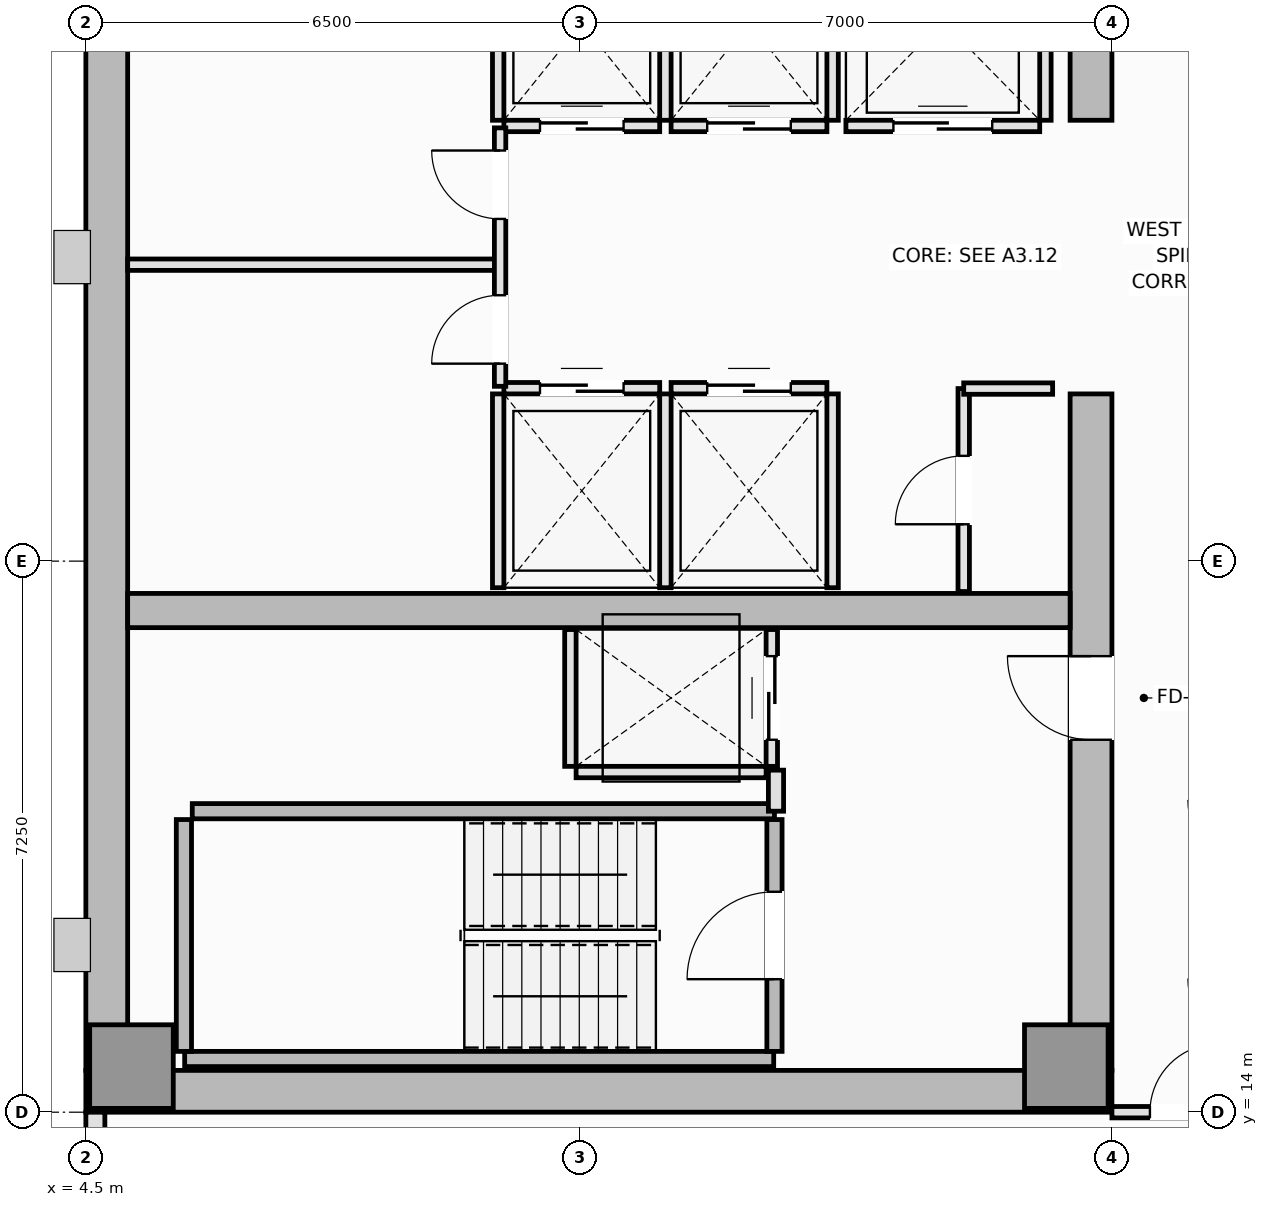
"""IFC4 building model, lengths in metres.
Left out: names, types, materials, properties, quantities, classifications, styles, units other than length and angle.
Written with IfcOpenShell. Run it as: python <this file> out.ifc"""

import sys

from ifc_helpers import new_model, si_unit, direction, frame, frame_2d, origin, origin_2d, place, context, subcontext, project, spatial, rectangle, extrude, element, fill, save


model = new_model("IFC4")
c1 = context("Model", 3, precision=1e-05, world=origin(), true_north=direction((0.0, 1.0)))
c2 = subcontext(c1, "Body", "Model", "MODEL_VIEW")
j1 = project(units=[si_unit("LENGTHUNIT", "METRE"), si_unit("PLANEANGLEUNIT", "RADIAN")], contexts=[c1])
p1 = place(None, origin())
s1 = spatial("IfcSite", under=j1, at=p1, CompositionType="ELEMENT")
p2 = place(p1, origin())
s2 = spatial("IfcBuilding", under=s1, at=p2, CompositionType="ELEMENT")
p3 = place(p2, frame((0.0, 0.0, 209.35)))
s3 = spatial("IfcBuildingStorey", under=s2, at=p3, CompositionType="ELEMENT", Elevation=209.35)
p4 = place(p3, frame((4.5, 14.275, 0.0), z_axis=(0.0, 0.0, 1.0), x_axis=(1.0, 0.0, 0.0)))
e1 = element("IfcWall", 1, at=p4, inside=s3, PredefinedType="SHEAR", context=c2, shape_type="SweptSolid", body=[
    extrude(rectangle(XDim=13.5, YDim=0.55, at=frame_2d((6.75, 0.0))), origin(), (0.0, 0.0, 1.0), 3.55),
])
p5 = place(p3, frame((4.775, 14.55, 0.0), z_axis=(0.0, 0.0, 1.0), x_axis=(0.0, 1.0, 0.0)))
e2 = element("IfcWall", 2, at=p5, inside=s3, PredefinedType="SHEAR", context=c2, shape_type="SweptSolid", body=[
    extrude(rectangle(XDim=21.4, YDim=0.55, at=frame_2d((10.7, 0.0))), origin(), (0.0, 0.0, 1.0), 3.55),
])
p6 = place(p3, frame((17.725, 14.55, 0.0), z_axis=(0.0, 0.0, 1.0), x_axis=(0.0, 1.0, 0.0)))
e3 = element("IfcWall", 3, at=p6, inside=s3, PredefinedType="SHEAR", context=c2, shape_type="SweptSolid", body=[
    extrude(rectangle(XDim=8.9, YDim=0.55, at=frame_2d((4.45, 0.0))), origin(), (0.0, 0.0, 1.0), 3.55),
])
p7 = place(p6, frame((4.35, 0.0, 0.0)))
e4 = element("IfcOpeningElement", 4, at=p7, cuts=e3, PredefinedType="OPENING", context=c2, shape_type="SweptSolid", body=[
    extrude(rectangle(XDim=1.1, YDim=2.15, at=frame_2d((0.55, 1.075))), frame((0.0, 0.285, 0.0), z_axis=(0.0, -1.0, 0.0), x_axis=(1.0, 0.0, 0.0)), (0.0, 0.0, 1.0), 0.57),
])
p8 = place(p3, frame((17.725, 27.05, 0.0), z_axis=(0.0, 0.0, 1.0), x_axis=(0.0, 1.0, 0.0)))
e5 = element("IfcWall", 5, at=p8, inside=s3, PredefinedType="SHEAR", context=c2, shape_type="SweptSolid", body=[
    extrude(rectangle(XDim=8.9, YDim=0.55, at=frame_2d((4.45, 0.0))), origin(), (0.0, 0.0, 1.0), 3.55),
])
p9 = place(p8, frame((3.45, 0.0, 0.0)))
e6 = element("IfcOpeningElement", 6, at=p9, cuts=e5, PredefinedType="OPENING", context=c2, shape_type="SweptSolid", body=[
    extrude(rectangle(XDim=1.1, YDim=2.15, at=frame_2d((0.55, 1.075))), frame((0.0, 0.285, 0.0), z_axis=(0.0, -1.0, 0.0), x_axis=(1.0, 0.0, 0.0)), (0.0, 0.0, 1.0), 0.57),
])
p10 = place(p3, frame((5.05, 20.6, 0.0), z_axis=(0.0, 0.0, 1.0), x_axis=(1.0, 0.0, 0.0)))
e7 = element("IfcWall", 7, at=p10, inside=s3, PredefinedType="SHEAR", context=c2, shape_type="SweptSolid", body=[
    extrude(rectangle(XDim=12.4, YDim=0.45, at=frame_2d((6.2, 0.0))), origin(), (0.0, 0.0, 1.0), 3.55),
])
for number, where, z_axis, x_axis in (
    (8, (5.1, 14.6, 0.0), (0.0, 0.0, 1.0), (1.0, 0.0, 0.0)),
    (9, (17.4, 14.6, 0.0), (0.0, 0.0, 1.0), (1.0, 0.0, 0.0)),
):
    element("IfcColumn", number, at=place(p3, frame(where, z_axis=z_axis, x_axis=x_axis)), inside=s3, PredefinedType="PILASTER", context=c2, shape_type="SweptSolid", body=[
        extrude(rectangle(XDim=1.1, YDim=1.1, at=origin_2d()), origin(), (0.0, 0.0, 1.0), 3.55),
    ])
p11 = place(p3, frame((4.625, 14.0, 0.0), z_axis=(0.0, 0.0, 1.0), x_axis=(0.0, -1.0, 0.0)))
e10 = element("IfcWall", 10, at=p11, inside=s3, PredefinedType="SOLIDWALL", context=c2, shape_type="SweptSolid", body=[
    extrude(rectangle(XDim=4.0, YDim=0.25, at=frame_2d((2.0, 0.0))), origin(), (0.0, 0.0, 1.0), 3.37),
])
p12 = place(p11, frame((0.9, 0.0, 0.9)))
e11 = element("IfcOpeningElement", 11, at=p12, cuts=e10, PredefinedType="OPENING", context=c2, shape_type="SweptSolid", body=[
    extrude(rectangle(XDim=2.2, YDim=1.8, at=frame_2d((1.1, 0.9))), frame((0.0, 0.135, 0.0), z_axis=(0.0, -1.0, 0.0), x_axis=(1.0, 0.0, 0.0)), (0.0, 0.0, 1.0), 0.27),
])
p13 = place(p3, frame((5.8, 14.7, 0.0), z_axis=(0.0, 0.0, 1.0), x_axis=(1.0, 0.0, 0.0)))
e12 = element("IfcWall", 12, at=p13, inside=s3, PredefinedType="SOLIDWALL", context=c2, shape_type="SweptSolid", body=[
    extrude(rectangle(XDim=7.75, YDim=0.2, at=frame_2d((3.875, 0.0))), origin(), (0.0, 0.0, 1.0), 3.55),
])
p14 = place(p3, frame((5.79, 14.8, 0.0), z_axis=(0.0, 0.0, 1.0), x_axis=(0.0, 1.0, 0.0)))
e13 = element("IfcWall", 13, at=p14, inside=s3, PredefinedType="SOLIDWALL", context=c2, shape_type="SweptSolid", body=[
    extrude(rectangle(XDim=3.05, YDim=0.2, at=frame_2d((1.525, 0.0))), origin(), (0.0, 0.0, 1.0), 3.55),
])
p15 = place(p3, frame((5.9, 17.96, 0.0), z_axis=(0.0, 0.0, 1.0), x_axis=(1.0, 0.0, 0.0)))
e14 = element("IfcWall", 14, at=p15, inside=s3, PredefinedType="SOLIDWALL", context=c2, shape_type="SweptSolid", body=[
    extrude(rectangle(XDim=7.66, YDim=0.2, at=frame_2d((3.83, 0.0))), origin(), (0.0, 0.0, 1.0), 3.55),
])
p16 = place(p3, frame((13.56, 14.8, 0.0), z_axis=(0.0, 0.0, 1.0), x_axis=(0.0, 1.0, 0.0)))
e15 = element("IfcWall", 15, at=p16, inside=s3, PredefinedType="SOLIDWALL", context=c2, shape_type="SweptSolid", body=[
    extrude(rectangle(XDim=3.05, YDim=0.2, at=frame_2d((1.525, 0.0))), origin(), (0.0, 0.0, 1.0), 3.55),
])
p17 = place(p16, frame((0.95, 0.0, 0.0)))
e16 = element("IfcOpeningElement", 16, at=p17, cuts=e15, PredefinedType="OPENING", context=c2, shape_type="SweptSolid", body=[
    extrude(rectangle(XDim=1.15, YDim=2.15, at=frame_2d((0.575, 1.075))), frame((0.0, 0.11, 0.0), z_axis=(0.0, -1.0, 0.0), x_axis=(1.0, 0.0, 0.0)), (0.0, 0.0, 1.0), 0.22),
])
p18 = place(p3, frame((10.0, 23.525, 0.0), z_axis=(0.0, 0.0, 1.0), x_axis=(1.0, 0.0, 0.0)))
e17 = element("IfcWall", 17, at=p18, inside=s3, PredefinedType="PARTITIONING", context=c2, shape_type="SweptSolid", body=[
    extrude(rectangle(XDim=2.05, YDim=0.15, at=frame_2d((1.025, 0.0))), origin(), (0.0, 0.0, 1.0), 3.37),
])
p19 = place(p18, frame((0.475, 0.0, 0.0)))
e18 = element("IfcOpeningElement", 18, at=p19, cuts=e17, PredefinedType="OPENING", context=c2, shape_type="SweptSolid", body=[
    extrude(rectangle(XDim=1.1, YDim=2.2, at=frame_2d((0.55, 1.1))), frame((0.0, 0.085, 0.0), z_axis=(0.0, -1.0, 0.0), x_axis=(1.0, 0.0, 0.0)), (0.0, 0.0, 1.0), 0.17),
])
for number, where, z_axis, x_axis in (
    (19, (9.925, 20.9, 0.0), (0.0, 0.0, 1.0), (0.0, 1.0, 0.0)),
    (20, (12.125, 20.9, 0.0), (0.0, 0.0, 1.0), (0.0, 1.0, 0.0)),
):
    element("IfcWall", number, at=place(p3, frame(where, z_axis=z_axis, x_axis=x_axis)), inside=s3, PredefinedType="PARTITIONING", context=c2, shape_type="SweptSolid", body=[
        extrude(rectangle(XDim=2.55, YDim=0.15, at=frame_2d((1.275, 0.0))), origin(), (0.0, 0.0, 1.0), 3.37),
    ])
p20 = place(p3, frame((12.2, 23.525, 0.0), z_axis=(0.0, 0.0, 1.0), x_axis=(1.0, 0.0, 0.0)))
e21 = element("IfcWall", 21, at=p20, inside=s3, PredefinedType="PARTITIONING", context=c2, shape_type="SweptSolid", body=[
    extrude(rectangle(XDim=2.05, YDim=0.15, at=frame_2d((1.025, 0.0))), origin(), (0.0, 0.0, 1.0), 3.37),
])
p21 = place(p20, frame((0.475, 0.0, 0.0)))
e22 = element("IfcOpeningElement", 22, at=p21, cuts=e21, PredefinedType="OPENING", context=c2, shape_type="SweptSolid", body=[
    extrude(rectangle(XDim=1.1, YDim=2.2, at=frame_2d((0.55, 1.1))), frame((0.0, 0.085, 0.0), z_axis=(0.0, -1.0, 0.0), x_axis=(1.0, 0.0, 0.0)), (0.0, 0.0, 1.0), 0.17),
])
p22 = place(p3, frame((14.325, 20.9, 0.0), z_axis=(0.0, 0.0, 1.0), x_axis=(0.0, 1.0, 0.0)))
e23 = element("IfcWall", 23, at=p22, inside=s3, PredefinedType="PARTITIONING", context=c2, shape_type="SweptSolid", body=[
    extrude(rectangle(XDim=2.55, YDim=0.15, at=frame_2d((1.275, 0.0))), origin(), (0.0, 0.0, 1.0), 3.37),
])
p23 = place(p3, frame((10.0, 26.975, 0.0), z_axis=(0.0, 0.0, 1.0), x_axis=(1.0, 0.0, 0.0)))
e24 = element("IfcWall", 24, at=p23, inside=s3, PredefinedType="PARTITIONING", context=c2, shape_type="SweptSolid", body=[
    extrude(rectangle(XDim=2.05, YDim=0.15, at=frame_2d((1.025, 0.0))), origin(), (0.0, 0.0, 1.0), 3.37),
])
p24 = place(p23, frame((0.475, 0.0, 0.0)))
e25 = element("IfcOpeningElement", 25, at=p24, cuts=e24, PredefinedType="OPENING", context=c2, shape_type="SweptSolid", body=[
    extrude(rectangle(XDim=1.1, YDim=2.2, at=frame_2d((0.55, 1.1))), frame((0.0, 0.085, 0.0), z_axis=(0.0, -1.0, 0.0), x_axis=(1.0, 0.0, 0.0)), (0.0, 0.0, 1.0), 0.17),
])
for number, where, z_axis, x_axis in (
    (26, (9.925, 27.05, 0.0), (0.0, 0.0, 1.0), (0.0, 1.0, 0.0)),
    (27, (12.125, 27.05, 0.0), (0.0, 0.0, 1.0), (0.0, 1.0, 0.0)),
):
    element("IfcWall", number, at=place(p3, frame(where, z_axis=z_axis, x_axis=x_axis)), inside=s3, PredefinedType="PARTITIONING", context=c2, shape_type="SweptSolid", body=[
        extrude(rectangle(XDim=2.55, YDim=0.15, at=frame_2d((1.275, 0.0))), origin(), (0.0, 0.0, 1.0), 3.37),
    ])
p25 = place(p3, frame((12.2, 26.975, 0.0), z_axis=(0.0, 0.0, 1.0), x_axis=(1.0, 0.0, 0.0)))
e28 = element("IfcWall", 28, at=p25, inside=s3, PredefinedType="PARTITIONING", context=c2, shape_type="SweptSolid", body=[
    extrude(rectangle(XDim=2.05, YDim=0.15, at=frame_2d((1.025, 0.0))), origin(), (0.0, 0.0, 1.0), 3.37),
])
p26 = place(p25, frame((0.475, 0.0, 0.0)))
e29 = element("IfcOpeningElement", 29, at=p26, cuts=e28, PredefinedType="OPENING", context=c2, shape_type="SweptSolid", body=[
    extrude(rectangle(XDim=1.1, YDim=2.2, at=frame_2d((0.55, 1.1))), frame((0.0, 0.085, 0.0), z_axis=(0.0, -1.0, 0.0), x_axis=(1.0, 0.0, 0.0)), (0.0, 0.0, 1.0), 0.17),
])
p27 = place(p3, frame((14.325, 27.05, 0.0), z_axis=(0.0, 0.0, 1.0), x_axis=(0.0, 1.0, 0.0)))
e30 = element("IfcWall", 30, at=p27, inside=s3, PredefinedType="PARTITIONING", context=c2, shape_type="SweptSolid", body=[
    extrude(rectangle(XDim=2.55, YDim=0.15, at=frame_2d((1.275, 0.0))), origin(), (0.0, 0.0, 1.0), 3.37),
])
p28 = place(p3, frame((14.5, 26.975, 0.0), z_axis=(0.0, 0.0, 1.0), x_axis=(1.0, 0.0, 0.0)))
e31 = element("IfcWall", 31, at=p28, inside=s3, PredefinedType="PARTITIONING", context=c2, shape_type="SweptSolid", body=[
    extrude(rectangle(XDim=2.55, YDim=0.15, at=frame_2d((1.275, 0.0))), origin(), (0.0, 0.0, 1.0), 3.37),
])
p29 = place(p28, frame((0.625, 0.0, 0.0)))
e32 = element("IfcOpeningElement", 32, at=p29, cuts=e31, PredefinedType="OPENING", context=c2, shape_type="SweptSolid", body=[
    extrude(rectangle(XDim=1.3, YDim=2.2, at=frame_2d((0.65, 1.1))), frame((0.0, 0.085, 0.0), z_axis=(0.0, -1.0, 0.0), x_axis=(1.0, 0.0, 0.0)), (0.0, 0.0, 1.0), 0.17),
])
p30 = place(p3, frame((17.125, 27.05, 0.0), z_axis=(0.0, 0.0, 1.0), x_axis=(0.0, 1.0, 0.0)))
e33 = element("IfcWall", 33, at=p30, inside=s3, PredefinedType="PARTITIONING", context=c2, shape_type="SweptSolid", body=[
    extrude(rectangle(XDim=2.6, YDim=0.15, at=frame_2d((1.3, 0.0))), origin(), (0.0, 0.0, 1.0), 3.37),
])
p31 = place(p3, frame((10.95, 18.475, 0.0), z_axis=(0.0, 0.0, 1.0), x_axis=(1.0, 0.0, 0.0)))
e34 = element("IfcWall", 34, at=p31, inside=s3, PredefinedType="PARTITIONING", context=c2, shape_type="SweptSolid", body=[
    extrude(rectangle(XDim=2.5, YDim=0.15, at=frame_2d((1.25, 0.0))), origin(), (0.0, 0.0, 1.0), 3.37),
])
p32 = place(p3, frame((10.875, 18.55, 0.0), z_axis=(0.0, 0.0, 1.0), x_axis=(0.0, 1.0, 0.0)))
e35 = element("IfcWall", 35, at=p32, inside=s3, PredefinedType="PARTITIONING", context=c2, shape_type="SweptSolid", body=[
    extrude(rectangle(XDim=1.8, YDim=0.15, at=frame_2d((0.9, 0.0))), origin(), (0.0, 0.0, 1.0), 3.37),
])
p33 = place(p3, frame((13.525, 18.55, 0.0), z_axis=(0.0, 0.0, 1.0), x_axis=(0.0, 1.0, 0.0)))
e36 = element("IfcWall", 36, at=p33, inside=s3, PredefinedType="PARTITIONING", context=c2, shape_type="SweptSolid", body=[
    extrude(rectangle(XDim=1.8, YDim=0.15, at=frame_2d((0.9, 0.0))), origin(), (0.0, 0.0, 1.0), 3.37),
])
p34 = place(p33, frame((0.35, 0.0, 0.0)))
e37 = element("IfcOpeningElement", 37, at=p34, cuts=e36, PredefinedType="OPENING", context=c2, shape_type="SweptSolid", body=[
    extrude(rectangle(XDim=1.1, YDim=2.2, at=frame_2d((0.55, 1.1))), frame((0.0, 0.085, 0.0), z_axis=(0.0, -1.0, 0.0), x_axis=(1.0, 0.0, 0.0)), (0.0, 0.0, 1.0), 0.17),
])
p35 = place(p3, frame((13.58, 17.96, 0.0), z_axis=(0.0, 0.0, 1.0), x_axis=(0.0, 1.0, 0.0)))
e38 = element("IfcWall", 38, at=p35, inside=s3, PredefinedType="PARTITIONING", context=c2, shape_type="SweptSolid", body=[
    extrude(rectangle(XDim=0.54, YDim=0.2, at=frame_2d((0.27, 0.0))), origin(), (0.0, 0.0, 1.0), 3.37),
])
p36 = place(p3, frame((5.05, 25.15, 0.0), z_axis=(0.0, 0.0, 1.0), x_axis=(1.0, 0.0, 0.0)))
e39 = element("IfcWall", 39, at=p36, inside=s3, PredefinedType="PARTITIONING", context=c2, shape_type="SweptSolid", body=[
    extrude(rectangle(XDim=4.9, YDim=0.15, at=frame_2d((2.45, 0.0))), origin(), (0.0, 0.0, 1.0), 3.37),
])
p37 = place(p3, frame((9.95, 23.55, 0.0), z_axis=(0.0, 0.0, 1.0), x_axis=(0.0, 1.0, 0.0)))
e40 = element("IfcWall", 40, at=p37, inside=s3, PredefinedType="PARTITIONING", context=c2, shape_type="SweptSolid", body=[
    extrude(rectangle(XDim=3.4, YDim=0.15, at=frame_2d((1.7, 0.0))), origin(), (0.0, 0.0, 1.0), 3.37),
])
p38 = place(p37, frame((0.298, 0.0, 0.0)))
e41 = element("IfcOpeningElement", 41, at=p38, cuts=e40, PredefinedType="OPENING", context=c2, shape_type="SweptSolid", body=[
    extrude(rectangle(XDim=0.9, YDim=2.1, at=frame_2d((0.45, 1.05))), frame((0.0, 0.085, 0.0), z_axis=(0.0, -1.0, 0.0), x_axis=(1.0, 0.0, 0.0)), (0.0, 0.0, 1.0), 0.17),
])
p39 = place(p37, frame((2.202, 0.0, 0.0)))
e42 = element("IfcOpeningElement", 42, at=p39, cuts=e40, PredefinedType="OPENING", context=c2, shape_type="SweptSolid", body=[
    extrude(rectangle(XDim=0.9, YDim=2.1, at=frame_2d((0.45, 1.05))), frame((0.0, 0.085, 0.0), z_axis=(0.0, -1.0, 0.0), x_axis=(1.0, 0.0, 0.0)), (0.0, 0.0, 1.0), 0.17),
])
p40 = place(p3, frame((16.05, 20.85, 0.0), z_axis=(0.0, 0.0, 1.0), x_axis=(0.0, 1.0, 0.0)))
e43 = element("IfcWall", 43, at=p40, inside=s3, PredefinedType="PARTITIONING", context=c2, shape_type="SweptSolid", body=[
    extrude(rectangle(XDim=2.67, YDim=0.15, at=frame_2d((1.335, 0.0))), origin(), (0.0, 0.0, 1.0), 3.37),
])
p41 = place(p40, frame((0.885, 0.0, 0.0)))
e44 = element("IfcOpeningElement", 44, at=p41, cuts=e43, PredefinedType="OPENING", context=c2, shape_type="SweptSolid", body=[
    extrude(rectangle(XDim=0.9, YDim=2.1, at=frame_2d((0.45, 1.05))), frame((0.0, 0.085, 0.0), z_axis=(0.0, -1.0, 0.0), x_axis=(1.0, 0.0, 0.0)), (0.0, 0.0, 1.0), 0.17),
])
p42 = place(p3, frame((16.05, 23.52, 0.0), z_axis=(0.0, 0.0, 1.0), x_axis=(1.0, 0.0, 0.0)))
e45 = element("IfcWall", 45, at=p42, inside=s3, PredefinedType="PARTITIONING", context=c2, shape_type="SweptSolid", body=[
    extrude(rectangle(XDim=1.17, YDim=0.15, at=frame_2d((0.585, 0.0))), origin(), (0.0, 0.0, 1.0), 3.37),
])
p43 = place(p3, frame((18.0, 14.0, 0.0), z_axis=(0.0, 0.0, 1.0), x_axis=(1.0, 0.0, 0.0)))
e46 = element("IfcWall", 46, at=p43, inside=s3, PredefinedType="PARTITIONING", context=c2, shape_type="SweptSolid", body=[
    extrude(rectangle(XDim=1.9, YDim=0.15, at=frame_2d((0.95, 0.0))), origin(), (0.0, 0.0, 1.0), 3.37),
])
p44 = place(p43, frame((0.5, 0.0, 0.0)))
e47 = element("IfcOpeningElement", 47, at=p44, cuts=e46, PredefinedType="OPENING", context=c2, shape_type="SweptSolid", body=[
    extrude(rectangle(XDim=0.9, YDim=2.1, at=frame_2d((0.45, 1.05))), frame((0.0, 0.085, 0.0), z_axis=(0.0, -1.0, 0.0), x_axis=(1.0, 0.0, 0.0)), (0.0, 0.0, 1.0), 0.17),
])
p45 = place(p17, origin())
e48 = element("IfcDoor", 48, at=p45, inside=s3, OperationType="SINGLE_SWING_LEFT", PredefinedType="DOOR", context=c2, shape_type="SweptSolid", body=[
    extrude(rectangle(XDim=1.15, YDim=2.15, at=frame_2d((0.575, 1.075))), frame((0.0, 0.025, 0.0), z_axis=(0.0, -1.0, 0.0), x_axis=(1.0, 0.0, 0.0)), (0.0, 0.0, 1.0), 0.05),
])
fill(e16, e48)
p46 = place(p19, origin())
e49 = element("IfcDoor", 49, at=p46, inside=s3, OperationType="DOUBLE_DOOR_SLIDING", PredefinedType="DOOR", context=c2, shape_type="SweptSolid", body=[
    extrude(rectangle(XDim=1.1, YDim=2.2, at=frame_2d((0.55, 1.1))), frame((0.0, 0.025, 0.0), z_axis=(0.0, -1.0, 0.0), x_axis=(1.0, 0.0, 0.0)), (0.0, 0.0, 1.0), 0.05),
])
fill(e18, e49)
p47 = place(p21, origin())
e50 = element("IfcDoor", 50, at=p47, inside=s3, OperationType="DOUBLE_DOOR_SLIDING", PredefinedType="DOOR", context=c2, shape_type="SweptSolid", body=[
    extrude(rectangle(XDim=1.1, YDim=2.2, at=frame_2d((0.55, 1.1))), frame((0.0, 0.025, 0.0), z_axis=(0.0, -1.0, 0.0), x_axis=(1.0, 0.0, 0.0)), (0.0, 0.0, 1.0), 0.05),
])
fill(e22, e50)
p48 = place(p24, origin())
e51 = element("IfcDoor", 51, at=p48, inside=s3, OperationType="DOUBLE_DOOR_SLIDING", PredefinedType="DOOR", context=c2, shape_type="SweptSolid", body=[
    extrude(rectangle(XDim=1.1, YDim=2.2, at=frame_2d((0.55, 1.1))), frame((0.0, 0.025, 0.0), z_axis=(0.0, -1.0, 0.0), x_axis=(1.0, 0.0, 0.0)), (0.0, 0.0, 1.0), 0.05),
])
fill(e25, e51)
p49 = place(p26, origin())
e52 = element("IfcDoor", 52, at=p49, inside=s3, OperationType="DOUBLE_DOOR_SLIDING", PredefinedType="DOOR", context=c2, shape_type="SweptSolid", body=[
    extrude(rectangle(XDim=1.1, YDim=2.2, at=frame_2d((0.55, 1.1))), frame((0.0, 0.025, 0.0), z_axis=(0.0, -1.0, 0.0), x_axis=(1.0, 0.0, 0.0)), (0.0, 0.0, 1.0), 0.05),
])
fill(e29, e52)
p50 = place(p29, origin())
e53 = element("IfcDoor", 53, at=p50, inside=s3, OperationType="DOUBLE_DOOR_SLIDING", PredefinedType="DOOR", context=c2, shape_type="SweptSolid", body=[
    extrude(rectangle(XDim=1.3, YDim=2.2, at=frame_2d((0.65, 1.1))), frame((0.0, 0.025, 0.0), z_axis=(0.0, -1.0, 0.0), x_axis=(1.0, 0.0, 0.0)), (0.0, 0.0, 1.0), 0.05),
])
fill(e32, e53)
p51 = place(p34, origin())
e54 = element("IfcDoor", 54, at=p51, inside=s3, OperationType="DOUBLE_DOOR_SLIDING", PredefinedType="DOOR", context=c2, shape_type="SweptSolid", body=[
    extrude(rectangle(XDim=1.1, YDim=2.2, at=frame_2d((0.55, 1.1))), frame((0.0, 0.025, 0.0), z_axis=(0.0, -1.0, 0.0), x_axis=(1.0, 0.0, 0.0)), (0.0, 0.0, 1.0), 0.05),
])
fill(e37, e54)
p52 = place(p7, origin())
e55 = element("IfcDoor", 55, at=p52, inside=s3, OperationType="SINGLE_SWING_RIGHT", PredefinedType="DOOR", context=c2, shape_type="SweptSolid", body=[
    extrude(rectangle(XDim=1.1, YDim=2.15, at=frame_2d((0.55, 1.075))), frame((0.0, 0.025, 0.0), z_axis=(0.0, -1.0, 0.0), x_axis=(1.0, 0.0, 0.0)), (0.0, 0.0, 1.0), 0.05),
])
fill(e4, e55)
p53 = place(p38, origin())
e56 = element("IfcDoor", 56, at=p53, inside=s3, OperationType="SINGLE_SWING_LEFT", PredefinedType="DOOR", context=c2, shape_type="SweptSolid", body=[
    extrude(rectangle(XDim=0.9, YDim=2.1, at=frame_2d((0.45, 1.05))), frame((0.0, 0.025, 0.0), z_axis=(0.0, -1.0, 0.0), x_axis=(1.0, 0.0, 0.0)), (0.0, 0.0, 1.0), 0.05),
])
fill(e41, e56)
p54 = place(p39, origin())
e57 = element("IfcDoor", 57, at=p54, inside=s3, OperationType="SINGLE_SWING_RIGHT", PredefinedType="DOOR", context=c2, shape_type="SweptSolid", body=[
    extrude(rectangle(XDim=0.9, YDim=2.1, at=frame_2d((0.45, 1.05))), frame((0.0, 0.025, 0.0), z_axis=(0.0, -1.0, 0.0), x_axis=(1.0, 0.0, 0.0)), (0.0, 0.0, 1.0), 0.05),
])
fill(e42, e57)
p55 = place(p41, origin())
e58 = element("IfcDoor", 58, at=p55, inside=s3, OperationType="SINGLE_SWING_LEFT", PredefinedType="DOOR", context=c2, shape_type="SweptSolid", body=[
    extrude(rectangle(XDim=0.9, YDim=2.1, at=frame_2d((0.45, 1.05))), frame((0.0, 0.025, 0.0), z_axis=(0.0, -1.0, 0.0), x_axis=(1.0, 0.0, 0.0)), (0.0, 0.0, 1.0), 0.05),
])
fill(e44, e58)
p56 = place(p44, origin())
e59 = element("IfcDoor", 59, at=p56, inside=s3, OperationType="SINGLE_SWING_RIGHT", PredefinedType="DOOR", context=c2, shape_type="SweptSolid", body=[
    extrude(rectangle(XDim=0.9, YDim=2.1, at=frame_2d((0.45, 1.05))), frame((0.0, 0.025, 0.0), z_axis=(0.0, -1.0, 0.0), x_axis=(1.0, 0.0, 0.0)), (0.0, 0.0, 1.0), 0.05),
])
fill(e47, e59)
save(model, sys.argv[1])
